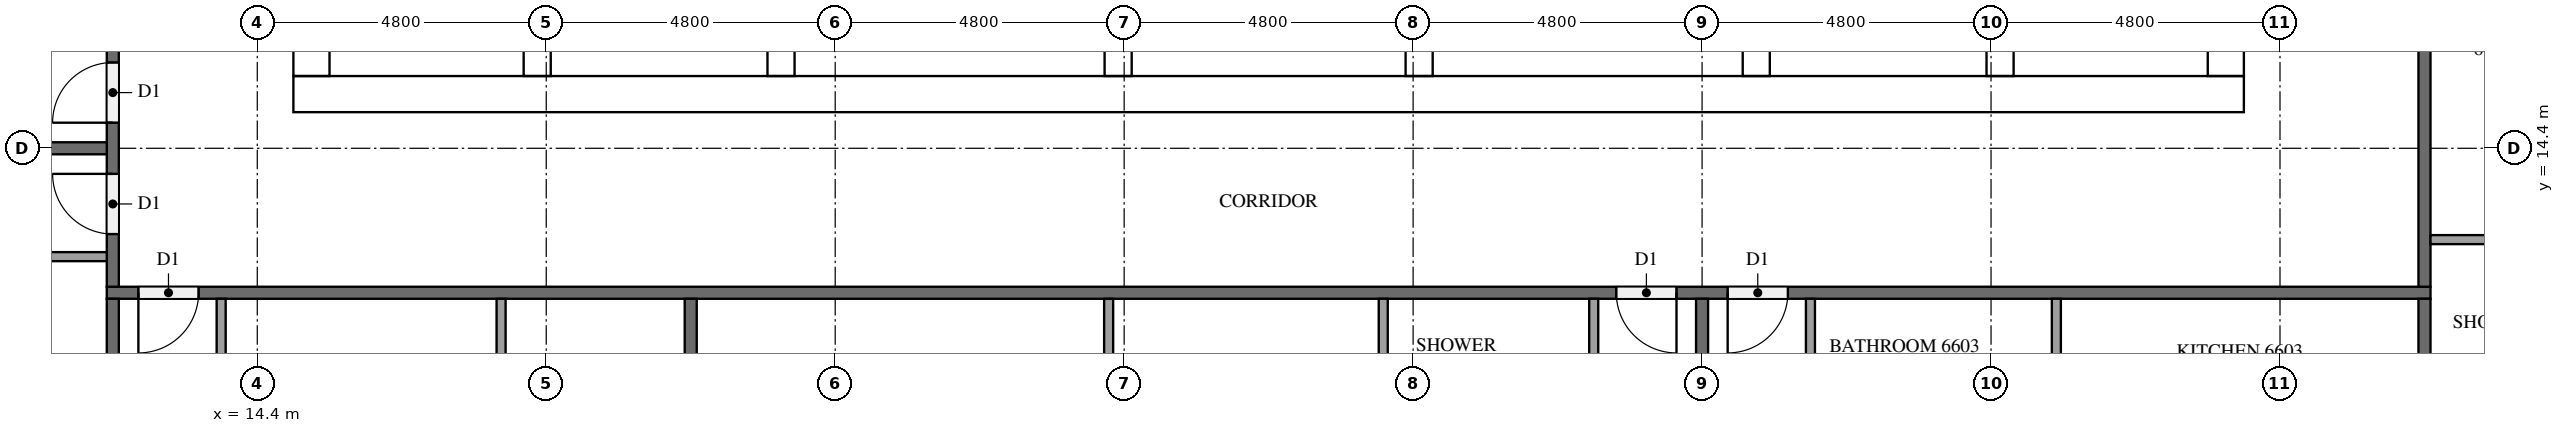
"""IFC4 building model, lengths in metres.
Left out: names, types, materials, properties, quantities, classifications, styles, units other than length and angle.
Written with IfcOpenShell. Run it as: python <this file> out.ifc"""

import sys

from ifc_helpers import new_model, si_unit, direction, frame, frame_2d, origin, place, context, subcontext, project, spatial, rectangle, extrude, element, fill, save


model = new_model("IFC4")
c1 = context("Model", 3, precision=1e-05, world=origin(), true_north=direction((0.0, 1.0)))
c2 = subcontext(c1, "Body", "Model", "MODEL_VIEW")
j1 = project(units=[si_unit("LENGTHUNIT", "METRE"), si_unit("PLANEANGLEUNIT", "RADIAN")], contexts=[c1])
p1 = place(None, origin())
s1 = spatial("IfcSite", under=j1, at=p1, CompositionType="ELEMENT")
p2 = place(p1, origin())
s2 = spatial("IfcBuilding", under=s1, at=p2, CompositionType="ELEMENT")
p3 = place(p2, frame((0.0, 0.0, 252.7)))
s3 = spatial("IfcBuildingStorey", under=s2, at=p3, CompositionType="ELEMENT", Elevation=252.7)
p4 = place(p3, frame((15.0, 15.3, 0.0), z_axis=(0.0, 0.0, 1.0), x_axis=(1.0, 0.0, 0.0)))
e1 = element("IfcWall", 1, at=p4, inside=s3, PredefinedType="SHEAR", context=c2, shape_type="SweptSolid", body=[
    extrude(rectangle(XDim=32.4, YDim=0.6, at=frame_2d((16.2, 0.0))), origin(), (0.0, 0.0, 1.0), 3.2),
])
p5 = place(p4, frame((15.3, 0.0, 0.0)))
e2 = element("IfcOpeningElement", 2, at=p5, cuts=e1, PredefinedType="OPENING", context=c2, shape_type="SweptSolid", body=[
    extrude(rectangle(XDim=1.8, YDim=2.1, at=frame_2d((0.9, 1.05))), frame((0.0, 0.31, 0.0), z_axis=(0.0, -1.0, 0.0), x_axis=(1.0, 0.0, 0.0)), (0.0, 0.0, 1.0), 0.62),
])
p6 = place(p3, frame((15.3, 15.6, 0.0), z_axis=(0.0, 0.0, 1.0), x_axis=(0.0, 1.0, 0.0)))
e3 = element("IfcWall", 3, at=p6, inside=s3, PredefinedType="SHEAR", context=c2, shape_type="SweptSolid", body=[
    extrude(rectangle(XDim=21.6, YDim=0.6, at=frame_2d((10.8, 0.0))), origin(), (0.0, 0.0, 1.0), 3.2),
])
p7 = place(p6, frame((5.16, 0.0, 0.0)))
e4 = element("IfcOpeningElement", 4, at=p7, cuts=e3, PredefinedType="OPENING", context=c2, shape_type="SweptSolid", body=[
    extrude(rectangle(XDim=1.2, YDim=2.1, at=frame_2d((0.6, 1.05))), frame((0.0, 0.31, 0.0), z_axis=(0.0, -1.0, 0.0), x_axis=(1.0, 0.0, 0.0)), (0.0, 0.0, 1.0), 0.62),
])
p8 = place(p3, frame((47.1, 15.6, 0.0), z_axis=(0.0, 0.0, 1.0), x_axis=(0.0, 1.0, 0.0)))
e5 = element("IfcWall", 5, at=p8, inside=s3, PredefinedType="SHEAR", context=c2, shape_type="SweptSolid", body=[
    extrude(rectangle(XDim=21.6, YDim=0.6, at=frame_2d((10.8, 0.0))), origin(), (0.0, 0.0, 1.0), 3.2),
])
p9 = place(p8, frame((10.5, 0.0, 0.0)))
e6 = element("IfcOpeningElement", 6, at=p9, cuts=e5, PredefinedType="OPENING", context=c2, shape_type="SweptSolid", body=[
    extrude(rectangle(XDim=1.2, YDim=2.1, at=frame_2d((0.6, 1.05))), frame((0.0, 0.31, 0.0), z_axis=(0.0, -1.0, 0.0), x_axis=(1.0, 0.0, 0.0)), (0.0, 0.0, 1.0), 0.62),
])
p10 = place(p3, frame((19.05, 15.6, 0.0), z_axis=(0.0, 0.0, 1.0), x_axis=(0.0, 1.0, 0.0)))
e7 = element("IfcWall", 7, at=p10, inside=s3, PredefinedType="SHEAR", context=c2, shape_type="SweptSolid", body=[
    extrude(rectangle(XDim=15.425, YDim=0.45, at=frame_2d((7.712, 0.0))), origin(), (0.0, 0.0, 1.0), 3.2),
])
p11 = place(p10, frame((9.85, 0.0, 0.0)))
e8 = element("IfcOpeningElement", 8, at=p11, cuts=e7, PredefinedType="OPENING", context=c2, shape_type="SweptSolid", body=[
    extrude(rectangle(XDim=1.1, YDim=2.1, at=frame_2d((0.55, 1.05))), frame((0.0, 0.235, 0.0), z_axis=(0.0, -1.0, 0.0), x_axis=(1.0, 0.0, 0.0)), (0.0, 0.0, 1.0), 0.47),
])
p12 = place(p10, frame((13.35, 0.0, 0.0)))
e9 = element("IfcOpeningElement", 9, at=p12, cuts=e7, PredefinedType="OPENING", context=c2, shape_type="SweptSolid", body=[
    extrude(rectangle(XDim=1.1, YDim=2.1, at=frame_2d((0.55, 1.05))), frame((0.0, 0.235, 0.0), z_axis=(0.0, -1.0, 0.0), x_axis=(1.0, 0.0, 0.0)), (0.0, 0.0, 1.0), 0.47),
])
p13 = place(p10, frame((0.6, 0.0, 0.0)))
e10 = element("IfcOpeningElement", 10, at=p13, cuts=e7, PredefinedType="OPENING", context=c2, shape_type="SweptSolid", body=[
    extrude(rectangle(XDim=1.2, YDim=2.1, at=frame_2d((0.6, 1.05))), frame((0.0, 0.235, 0.0), z_axis=(0.0, -1.0, 0.0), x_axis=(1.0, 0.0, 0.0)), (0.0, 0.0, 1.0), 0.47),
])
p14 = place(p3, frame((23.1, 15.6, 0.0), z_axis=(0.0, 0.0, 1.0), x_axis=(0.0, 1.0, 0.0)))
e11 = element("IfcWall", 11, at=p14, inside=s3, PredefinedType="SHEAR", context=c2, shape_type="SweptSolid", body=[
    extrude(rectangle(XDim=21.6, YDim=0.45, at=frame_2d((10.8, 0.0))), origin(), (0.0, 0.0, 1.0), 3.2),
])
p15 = place(p3, frame((39.3, 15.6, 0.0), z_axis=(0.0, 0.0, 1.0), x_axis=(0.0, 1.0, 0.0)))
e12 = element("IfcWall", 12, at=p15, inside=s3, PredefinedType="SHEAR", context=c2, shape_type="SweptSolid", body=[
    extrude(rectangle(XDim=8.65, YDim=0.45, at=frame_2d((4.325, 0.0))), origin(), (0.0, 0.0, 1.0), 3.2),
])
p16 = place(p3, frame((43.35, 15.6, 0.0), z_axis=(0.0, 0.0, 1.0), x_axis=(0.0, 1.0, 0.0)))
e13 = element("IfcWall", 13, at=p16, inside=s3, PredefinedType="SHEAR", context=c2, shape_type="SweptSolid", body=[
    extrude(rectangle(XDim=8.65, YDim=0.45, at=frame_2d((4.325, 0.0))), origin(), (0.0, 0.0, 1.0), 3.2),
])
p17 = place(p16, frame((0.6, 0.0, 0.0)))
e14 = element("IfcOpeningElement", 14, at=p17, cuts=e13, PredefinedType="OPENING", context=c2, shape_type="SweptSolid", body=[
    extrude(rectangle(XDim=1.2, YDim=2.1, at=frame_2d((0.6, 1.05))), frame((0.0, 0.235, 0.0), z_axis=(0.0, -1.0, 0.0), x_axis=(1.0, 0.0, 0.0)), (0.0, 0.0, 1.0), 0.47),
])
for number, where, z_axis, x_axis in (
    (15, (28.7, 15.6, 0.0), (0.0, 0.0, 1.0), (0.0, 1.0, 0.0)),
    (16, (33.7, 15.6, 0.0), (0.0, 0.0, 1.0), (0.0, 1.0, 0.0)),
):
    element("IfcWall", number, at=place(p3, frame(where, z_axis=z_axis, x_axis=x_axis)), inside=s3, PredefinedType="SHEAR", context=c2, shape_type="SweptSolid", body=[
        extrude(rectangle(XDim=2.925, YDim=0.45, at=frame_2d((1.462, 0.0))), origin(), (0.0, 0.0, 1.0), 3.2),
    ])
p18 = place(p3, frame((50.5, 12.0, 0.0), z_axis=(0.0, 0.0, 1.0), x_axis=(-1.0, 0.0, 0.0)))
e17 = element("IfcWall", 17, at=p18, inside=s3, PredefinedType="PARTITIONING", context=c2, shape_type="SweptSolid", body=[
    extrude(rectangle(XDim=38.6, YDim=0.2, at=frame_2d((19.3, 0.0))), origin(), (0.0, 0.0, 1.0), 3.2),
])
p19 = place(p18, frame((37.075, 0.0, 0.0)))
e18 = element("IfcOpeningElement", 18, at=p19, cuts=e17, PredefinedType="OPENING", context=c2, shape_type="SweptSolid", body=[
    extrude(rectangle(XDim=1.0, YDim=2.1, at=frame_2d((0.5, 1.05))), frame((0.0, 0.11, 0.0), z_axis=(0.0, -1.0, 0.0), x_axis=(1.0, 0.0, 0.0)), (0.0, 0.0, 1.0), 0.22),
])
p20 = place(p18, frame((12.525, 0.0, 0.0)))
e19 = element("IfcOpeningElement", 19, at=p20, cuts=e17, PredefinedType="OPENING", context=c2, shape_type="SweptSolid", body=[
    extrude(rectangle(XDim=1.0, YDim=2.1, at=frame_2d((0.5, 1.05))), frame((0.0, 0.11, 0.0), z_axis=(0.0, -1.0, 0.0), x_axis=(1.0, 0.0, 0.0)), (0.0, 0.0, 1.0), 0.22),
])
p21 = place(p18, frame((10.675, 0.0, 0.0)))
e20 = element("IfcOpeningElement", 20, at=p21, cuts=e17, PredefinedType="OPENING", context=c2, shape_type="SweptSolid", body=[
    extrude(rectangle(XDim=1.0, YDim=2.1, at=frame_2d((0.5, 1.05))), frame((0.0, 0.11, 0.0), z_axis=(0.0, -1.0, 0.0), x_axis=(1.0, 0.0, 0.0)), (0.0, 0.0, 1.0), 0.22),
])
p22 = place(p3, frame((50.4, 40.7, 0.0), z_axis=(0.0, 0.0, 1.0), x_axis=(0.0, -1.0, 0.0)))
e21 = element("IfcWall", 21, at=p22, inside=s3, PredefinedType="PARTITIONING", context=c2, shape_type="SweptSolid", body=[
    extrude(rectangle(XDim=28.6, YDim=0.2, at=frame_2d((14.3, 0.0))), origin(), (0.0, 0.0, 1.0), 3.2),
])
p23 = place(p22, frame((19.525, 0.0, 0.0)))
e22 = element("IfcOpeningElement", 22, at=p23, cuts=e21, PredefinedType="OPENING", context=c2, shape_type="SweptSolid", body=[
    extrude(rectangle(XDim=1.0, YDim=2.1, at=frame_2d((0.5, 1.05))), frame((0.0, 0.11, 0.0), z_axis=(0.0, -1.0, 0.0), x_axis=(1.0, 0.0, 0.0)), (0.0, 0.0, 1.0), 0.22),
])
p24 = place(p22, frame((17.675, 0.0, 0.0)))
e23 = element("IfcOpeningElement", 23, at=p24, cuts=e21, PredefinedType="OPENING", context=c2, shape_type="SweptSolid", body=[
    extrude(rectangle(XDim=1.0, YDim=2.1, at=frame_2d((0.5, 1.05))), frame((0.0, 0.11, 0.0), z_axis=(0.0, -1.0, 0.0), x_axis=(1.0, 0.0, 0.0)), (0.0, 0.0, 1.0), 0.22),
])
p25 = place(p22, frame((0.325, 0.0, 0.0)))
e24 = element("IfcOpeningElement", 24, at=p25, cuts=e21, PredefinedType="OPENING", context=c2, shape_type="SweptSolid", body=[
    extrude(rectangle(XDim=1.0, YDim=2.1, at=frame_2d((0.5, 1.05))), frame((0.0, 0.11, 0.0), z_axis=(0.0, -1.0, 0.0), x_axis=(1.0, 0.0, 0.0)), (0.0, 0.0, 1.0), 0.22),
])
p26 = place(p3, frame((12.0, 12.1, 0.0), z_axis=(0.0, 0.0, 1.0), x_axis=(0.0, 1.0, 0.0)))
e25 = element("IfcWall", 25, at=p26, inside=s3, PredefinedType="PARTITIONING", context=c2, shape_type="SweptSolid", body=[
    extrude(rectangle(XDim=28.6, YDim=0.2, at=frame_2d((14.3, 0.0))), origin(), (0.0, 0.0, 1.0), 3.2),
])
p27 = place(p26, frame((26.725, 0.0, 0.0)))
e26 = element("IfcOpeningElement", 26, at=p27, cuts=e25, PredefinedType="OPENING", context=c2, shape_type="SweptSolid", body=[
    extrude(rectangle(XDim=1.0, YDim=2.1, at=frame_2d((0.5, 1.05))), frame((0.0, 0.11, 0.0), z_axis=(0.0, -1.0, 0.0), x_axis=(1.0, 0.0, 0.0)), (0.0, 0.0, 1.0), 0.22),
])
p28 = place(p26, frame((24.875, 0.0, 0.0)))
e27 = element("IfcOpeningElement", 27, at=p28, cuts=e25, PredefinedType="OPENING", context=c2, shape_type="SweptSolid", body=[
    extrude(rectangle(XDim=1.0, YDim=2.1, at=frame_2d((0.5, 1.05))), frame((0.0, 0.11, 0.0), z_axis=(0.0, -1.0, 0.0), x_axis=(1.0, 0.0, 0.0)), (0.0, 0.0, 1.0), 0.22),
])
p29 = place(p26, frame((17.675, 0.0, 0.0)))
e28 = element("IfcOpeningElement", 28, at=p29, cuts=e25, PredefinedType="OPENING", context=c2, shape_type="SweptSolid", body=[
    extrude(rectangle(XDim=1.0, YDim=2.1, at=frame_2d((0.5, 1.05))), frame((0.0, 0.11, 0.0), z_axis=(0.0, -1.0, 0.0), x_axis=(1.0, 0.0, 0.0)), (0.0, 0.0, 1.0), 0.22),
])
p30 = place(p26, frame((2.725, 0.0, 0.0)))
e29 = element("IfcOpeningElement", 29, at=p30, cuts=e25, PredefinedType="OPENING", context=c2, shape_type="SweptSolid", body=[
    extrude(rectangle(XDim=1.0, YDim=2.1, at=frame_2d((0.5, 1.05))), frame((0.0, 0.11, 0.0), z_axis=(0.0, -1.0, 0.0), x_axis=(1.0, 0.0, 0.0)), (0.0, 0.0, 1.0), 0.22),
])
p31 = place(p26, frame((0.875, 0.0, 0.0)))
e30 = element("IfcOpeningElement", 30, at=p31, cuts=e25, PredefinedType="OPENING", context=c2, shape_type="SweptSolid", body=[
    extrude(rectangle(XDim=1.0, YDim=2.1, at=frame_2d((0.5, 1.05))), frame((0.0, 0.11, 0.0), z_axis=(0.0, -1.0, 0.0), x_axis=(1.0, 0.0, 0.0)), (0.0, 0.0, 1.0), 0.22),
])
for number, where, z_axis, x_axis in (
    (31, (21.6, 11.9, 0.0), (0.0, 0.0, 1.0), (0.0, -1.0, 0.0)),
    (32, (12.0, 4.9, 0.0), (0.0, 0.0, 1.0), (0.0, 1.0, 0.0)),
    (33, (38.4, 11.9, 0.0), (0.0, 0.0, 1.0), (0.0, -1.0, 0.0)),
    (34, (50.4, 11.9, 0.0), (0.0, 0.0, 1.0), (0.0, -1.0, 0.0)),
):
    element("IfcWall", number, at=place(p3, frame(where, z_axis=z_axis, x_axis=x_axis)), inside=s3, PredefinedType="PARTITIONING", context=c2, shape_type="SweptSolid", body=[
        extrude(rectangle(XDim=7.0, YDim=0.2, at=frame_2d((3.5, 0.0))), origin(), (0.0, 0.0, 1.0), 3.2),
    ])
p32 = place(p3, frame((0.1, 14.4, 0.0), z_axis=(0.0, 0.0, 1.0), x_axis=(1.0, 0.0, 0.0)))
e35 = element("IfcWall", 35, at=p32, inside=s3, PredefinedType="PARTITIONING", context=c2, shape_type="SweptSolid", body=[
    extrude(rectangle(XDim=11.8, YDim=0.2, at=frame_2d((5.9, 0.0))), origin(), (0.0, 0.0, 1.0), 3.2),
])
p33 = place(p3, frame((18.45, 11.9, 0.0), z_axis=(0.0, 0.0, 1.0), x_axis=(0.0, -1.0, 0.0)))
e36 = element("IfcWall", 36, at=p33, inside=s3, PredefinedType="PARTITIONING", context=c2, shape_type="SweptSolid", body=[
    extrude(rectangle(XDim=2.375, YDim=0.15, at=frame_2d((1.188, 0.0))), origin(), (0.0, 0.0, 1.0), 3.2),
])
p34 = place(p3, frame((13.8, 11.9, 0.0), z_axis=(0.0, 0.0, 1.0), x_axis=(0.0, -1.0, 0.0)))
e37 = element("IfcWall", 37, at=p34, inside=s3, PredefinedType="PARTITIONING", context=c2, shape_type="SweptSolid", body=[
    extrude(rectangle(XDim=2.525, YDim=0.15, at=frame_2d((1.262, 0.0))), origin(), (0.0, 0.0, 1.0), 3.2),
])
for number, where, z_axis, x_axis in (
    (38, (33.104, 11.9, 0.0), (0.0, 0.0, 1.0), (0.0, -1.0, 0.0)),
    (39, (28.542, 11.9, 0.0), (0.0, 0.0, 1.0), (0.0, -1.0, 0.0)),
):
    element("IfcWall", number, at=place(p3, frame(where, z_axis=z_axis, x_axis=x_axis)), inside=s3, PredefinedType="PARTITIONING", context=c2, shape_type="SweptSolid", body=[
        extrude(rectangle(XDim=2.075, YDim=0.15, at=frame_2d((1.038, 0.0))), origin(), (0.0, 0.0, 1.0), 3.2),
    ])
p35 = place(p3, frame((36.6, 11.9, 0.0), z_axis=(0.0, 0.0, 1.0), x_axis=(0.0, -1.0, 0.0)))
e40 = element("IfcWall", 40, at=p35, inside=s3, PredefinedType="PARTITIONING", context=c2, shape_type="SweptSolid", body=[
    extrude(rectangle(XDim=2.225, YDim=0.15, at=frame_2d((1.112, 0.0))), origin(), (0.0, 0.0, 1.0), 3.2),
])
p36 = place(p3, frame((44.285, 11.9, 0.0), z_axis=(0.0, 0.0, 1.0), x_axis=(0.0, -1.0, 0.0)))
e41 = element("IfcWall", 41, at=p36, inside=s3, PredefinedType="PARTITIONING", context=c2, shape_type="SweptSolid", body=[
    extrude(rectangle(XDim=1.775, YDim=0.15, at=frame_2d((0.887, 0.0))), origin(), (0.0, 0.0, 1.0), 3.2),
])
p37 = place(p3, frame((40.2, 11.9, 0.0), z_axis=(0.0, 0.0, 1.0), x_axis=(0.0, -1.0, 0.0)))
e42 = element("IfcWall", 42, at=p37, inside=s3, PredefinedType="PARTITIONING", context=c2, shape_type="SweptSolid", body=[
    extrude(rectangle(XDim=1.925, YDim=0.15, at=frame_2d((0.962, 0.0))), origin(), (0.0, 0.0, 1.0), 3.2),
])
p38 = place(p3, frame((50.5, 12.883, 0.0), z_axis=(0.0, 0.0, 1.0), x_axis=(1.0, 0.0, 0.0)))
e43 = element("IfcWall", 43, at=p38, inside=s3, PredefinedType="PARTITIONING", context=c2, shape_type="SweptSolid", body=[
    extrude(rectangle(XDim=2.075, YDim=0.15, at=frame_2d((1.038, 0.0))), origin(), (0.0, 0.0, 1.0), 3.2),
])
p39 = place(p3, frame((11.9, 12.6, 0.0), z_axis=(0.0, 0.0, 1.0), x_axis=(-1.0, 0.0, 0.0)))
e44 = element("IfcWall", 44, at=p39, inside=s3, PredefinedType="PARTITIONING", context=c2, shape_type="SweptSolid", body=[
    extrude(rectangle(XDim=4.025, YDim=0.15, at=frame_2d((2.012, 0.0))), origin(), (0.0, 0.0, 1.0), 3.2),
])
p40 = place(p5, frame((1.8, 0.0, 0.0), z_axis=(0.0, 0.0, 1.0), x_axis=(-1.0, 0.0, 0.0)))
e45 = element("IfcDoor", 45, at=p40, inside=s3, OperationType="DOUBLE_DOOR_SINGLE_SWING", PredefinedType="DOOR", context=c2, shape_type="SweptSolid", body=[
    extrude(rectangle(XDim=1.8, YDim=2.1, at=frame_2d((0.9, 1.05))), frame((0.0, 0.025, 0.0), z_axis=(0.0, -1.0, 0.0), x_axis=(1.0, 0.0, 0.0)), (0.0, 0.0, 1.0), 0.05),
])
fill(e2, e45)
p41 = place(p19, origin())
e46 = element("IfcDoor", 46, at=p41, inside=s3, OperationType="SINGLE_SWING_RIGHT", PredefinedType="DOOR", context=c2, shape_type="SweptSolid", body=[
    extrude(rectangle(XDim=1.0, YDim=2.1, at=frame_2d((0.5, 1.05))), frame((0.0, 0.025, 0.0), z_axis=(0.0, -1.0, 0.0), x_axis=(1.0, 0.0, 0.0)), (0.0, 0.0, 1.0), 0.05),
])
fill(e18, e46)
p42 = place(p20, origin())
e47 = element("IfcDoor", 47, at=p42, inside=s3, OperationType="SINGLE_SWING_LEFT", PredefinedType="DOOR", context=c2, shape_type="SweptSolid", body=[
    extrude(rectangle(XDim=1.0, YDim=2.1, at=frame_2d((0.5, 1.05))), frame((0.0, 0.025, 0.0), z_axis=(0.0, -1.0, 0.0), x_axis=(1.0, 0.0, 0.0)), (0.0, 0.0, 1.0), 0.05),
])
fill(e19, e47)
p43 = place(p21, origin())
e48 = element("IfcDoor", 48, at=p43, inside=s3, OperationType="SINGLE_SWING_RIGHT", PredefinedType="DOOR", context=c2, shape_type="SweptSolid", body=[
    extrude(rectangle(XDim=1.0, YDim=2.1, at=frame_2d((0.5, 1.05))), frame((0.0, 0.025, 0.0), z_axis=(0.0, -1.0, 0.0), x_axis=(1.0, 0.0, 0.0)), (0.0, 0.0, 1.0), 0.05),
])
fill(e20, e48)
p44 = place(p30, origin())
e49 = element("IfcDoor", 49, at=p44, inside=s3, OperationType="SINGLE_SWING_LEFT", PredefinedType="DOOR", context=c2, shape_type="SweptSolid", body=[
    extrude(rectangle(XDim=1.0, YDim=2.1, at=frame_2d((0.5, 1.05))), frame((0.0, 0.025, 0.0), z_axis=(0.0, -1.0, 0.0), x_axis=(1.0, 0.0, 0.0)), (0.0, 0.0, 1.0), 0.05),
])
fill(e29, e49)
p45 = place(p31, origin())
e50 = element("IfcDoor", 50, at=p45, inside=s3, OperationType="SINGLE_SWING_RIGHT", PredefinedType="DOOR", context=c2, shape_type="SweptSolid", body=[
    extrude(rectangle(XDim=1.0, YDim=2.1, at=frame_2d((0.5, 1.05))), frame((0.0, 0.025, 0.0), z_axis=(0.0, -1.0, 0.0), x_axis=(1.0, 0.0, 0.0)), (0.0, 0.0, 1.0), 0.05),
])
fill(e30, e50)
save(model, sys.argv[1])
